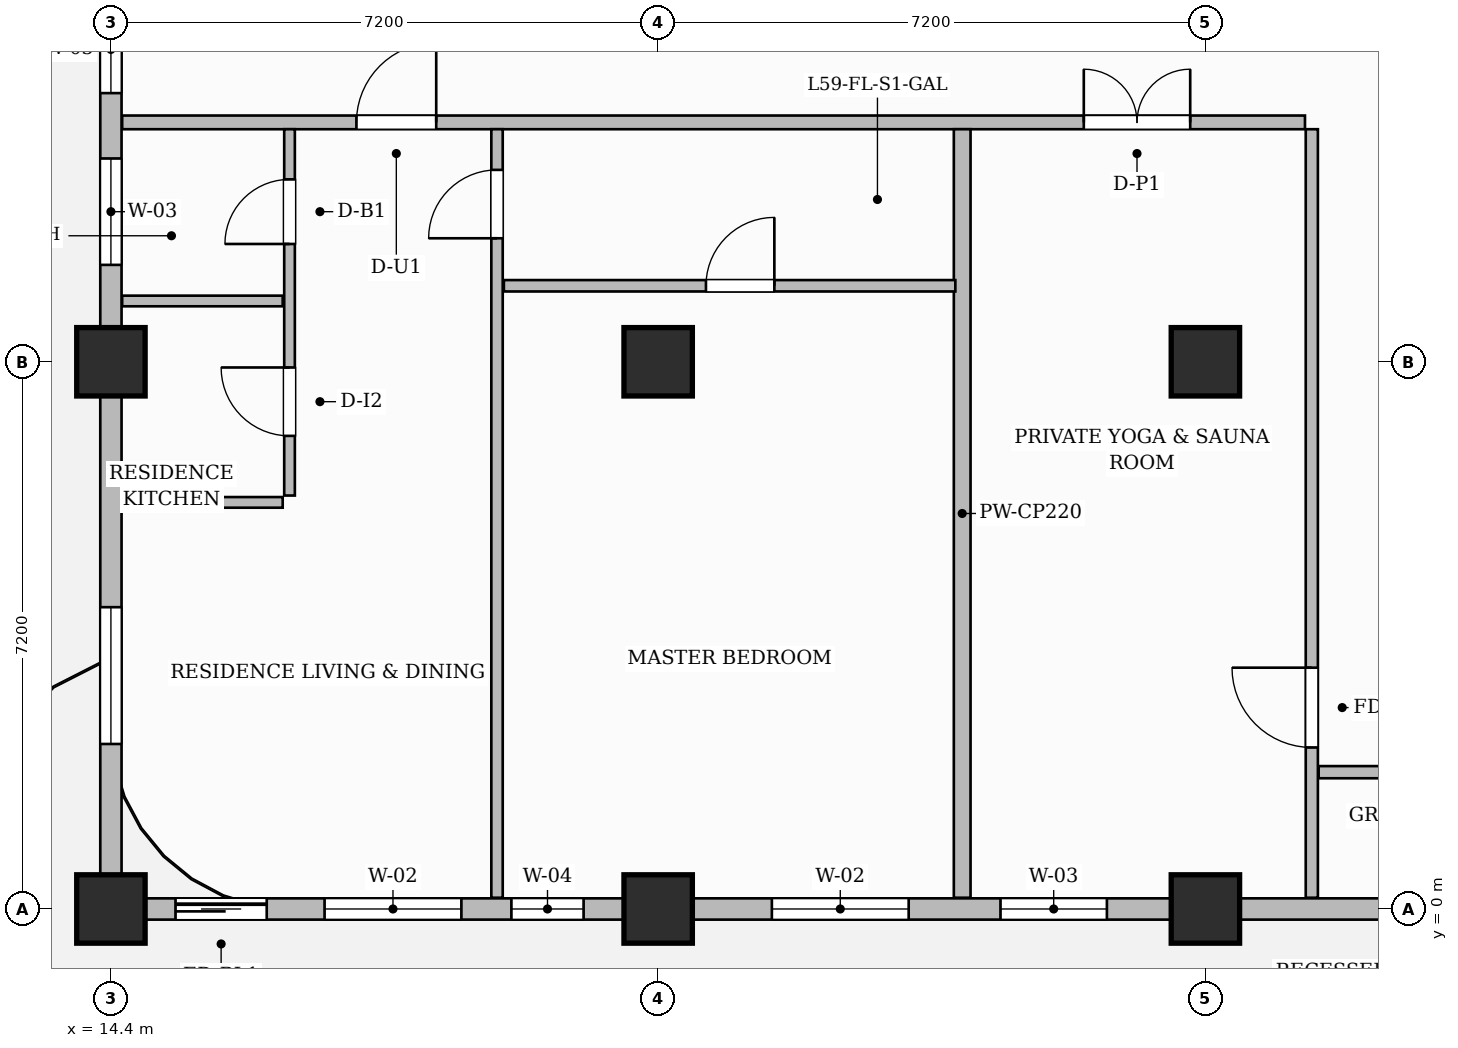
"""IFC4 building model, lengths in metres.
Left out: names, types, materials, properties, quantities, classifications, styles, units other than length and angle.
Written with IfcOpenShell. Run it as: python <this file> out.ifc"""

import sys

from ifc_helpers import new_model, si_unit, direction, frame, frame_2d, origin, origin_2d, place, context, subcontext, project, spatial, rectangle, extrude, source, transform, mapped, element, fill, save


model = new_model("IFC4")
c1 = context("Model", 3, precision=1e-05, world=origin(), true_north=direction((0.0, 1.0)))
c2 = subcontext(c1, "Body", "Model", "MODEL_VIEW")
j1 = project(units=[si_unit("LENGTHUNIT", "METRE"), si_unit("PLANEANGLEUNIT", "RADIAN")], contexts=[c1])
p1 = place(None, origin())
s1 = spatial("IfcSite", under=j1, at=p1, CompositionType="ELEMENT")
p2 = place(p1, origin())
s2 = spatial("IfcBuilding", under=s1, at=p2, CompositionType="ELEMENT")
p3 = place(p2, frame((0.0, 0.0, 236.55)))
s3 = spatial("IfcBuildingStorey", under=s2, at=p3, CompositionType="ELEMENT", Elevation=236.55)
m1 = source(origin(), c2, "Body", "SweptSolid", [
    extrude(rectangle(XDim=0.9, YDim=0.9, at=origin_2d()), origin(), (0.0, 0.0, 1.0), 3.85),
])
for number, where, z_axis, x_axis in (
    (1, (14.4, 0.0, 0.0), (0.0, 0.0, 1.0), (1.0, 0.0, 0.0)),
    (2, (14.4, 7.2, 0.0), (0.0, 0.0, 1.0), (1.0, 0.0, 0.0)),
    (3, (21.6, 0.0, 0.0), (0.0, 0.0, 1.0), (1.0, 0.0, 0.0)),
    (4, (21.6, 7.2, 0.0), (0.0, 0.0, 1.0), (1.0, 0.0, 0.0)),
    (5, (28.8, 0.0, 0.0), (0.0, 0.0, 1.0), (1.0, 0.0, 0.0)),
    (6, (28.8, 7.2, 0.0), (0.0, 0.0, 1.0), (1.0, 0.0, 0.0)),
):
    element("IfcColumn", number, at=place(p3, frame(where, z_axis=z_axis, x_axis=x_axis)), inside=s3, PredefinedType="COLUMN", context=c2, shape_type="MappedRepresentation", body=[
        mapped(m1, transform((0.0, 0.0, 0.0), scale=1.0)),
    ])
p4 = place(p3, frame((14.548, 10.35, 0.0), z_axis=(0.0, 0.0, 1.0), x_axis=(1.0, 0.0, 0.0)))
e7 = element("IfcWall", 7, at=p4, inside=s3, PredefinedType="PARTITIONING", context=c2, shape_type="SweptSolid", body=[
    extrude(rectangle(XDim=15.562, YDim=0.18, at=frame_2d((7.781, 0.0))), origin(), (0.0, 0.0, 1.0), 3.6),
])
p5 = place(p4, frame((3.082, 0.0, 0.0)))
e8 = element("IfcOpeningElement", 8, at=p5, cuts=e7, PredefinedType="OPENING", context=c2, shape_type="SweptSolid", body=[
    extrude(rectangle(XDim=1.05, YDim=2.25, at=frame_2d((0.525, 1.125))), frame((0.0, 0.1, 0.0), z_axis=(0.0, -1.0, 0.0), x_axis=(1.0, 0.0, 0.0)), (0.0, 0.0, 1.0), 0.2),
])
p6 = place(p4, frame((12.652, 0.0, 0.0)))
e9 = element("IfcOpeningElement", 9, at=p6, cuts=e7, PredefinedType="OPENING", context=c2, shape_type="SweptSolid", body=[
    extrude(rectangle(XDim=1.4, YDim=2.35, at=frame_2d((0.7, 1.175))), frame((0.0, 0.1, 0.0), z_axis=(0.0, -1.0, 0.0), x_axis=(1.0, 0.0, 0.0)), (0.0, 0.0, 1.0), 0.2),
])
p7 = place(p3, frame((30.2, 0.148, 0.0), z_axis=(0.0, 0.0, 1.0), x_axis=(0.0, 1.0, 0.0)))
e10 = element("IfcWall", 10, at=p7, inside=s3, PredefinedType="PARTITIONING", context=c2, shape_type="SweptSolid", body=[
    extrude(rectangle(XDim=10.112, YDim=0.16, at=frame_2d((5.056, 0.0))), origin(), (0.0, 0.0, 1.0), 3.6),
])
p8 = place(p7, frame((1.977, 0.0, 0.0)))
e11 = element("IfcOpeningElement", 11, at=p8, cuts=e10, PredefinedType="OPENING", context=c2, shape_type="SweptSolid", body=[
    extrude(rectangle(XDim=1.05, YDim=2.15, at=frame_2d((0.525, 1.075))), frame((0.0, 0.09, 0.0), z_axis=(0.0, -1.0, 0.0), x_axis=(1.0, 0.0, 0.0)), (0.0, 0.0, 1.0), 0.18),
])
p9 = place(p3, frame((30.29, 1.8, 0.0), z_axis=(0.0, 0.0, 1.0), x_axis=(1.0, 0.0, 0.0)))
e12 = element("IfcWall", 12, at=p9, inside=s3, PredefinedType="PARTITIONING", context=c2, shape_type="SweptSolid", body=[
    extrude(rectangle(XDim=19.37, YDim=0.16, at=frame_2d((9.685, 0.0))), origin(), (0.0, 0.0, 1.0), 3.6),
])
p10 = place(p9, frame((3.054, 0.0, 0.0)))
e13 = element("IfcOpeningElement", 13, at=p10, cuts=e12, PredefinedType="OPENING", context=c2, shape_type="SweptSolid", body=[
    extrude(rectangle(XDim=0.9, YDim=2.15, at=frame_2d((0.45, 1.075))), frame((0.0, 0.09, 0.0), z_axis=(0.0, -1.0, 0.0), x_axis=(1.0, 0.0, 0.0)), (0.0, 0.0, 1.0), 0.18),
])
p11 = place(p9, frame((9.66, 0.0, 0.0)))
e14 = element("IfcOpeningElement", 14, at=p11, cuts=e12, PredefinedType="OPENING", context=c2, shape_type="SweptSolid", body=[
    extrude(rectangle(XDim=0.9, YDim=2.15, at=frame_2d((0.45, 1.075))), frame((0.0, 0.09, 0.0), z_axis=(0.0, -1.0, 0.0), x_axis=(1.0, 0.0, 0.0)), (0.0, 0.0, 1.0), 0.18),
])
p12 = place(p9, frame((15.86, 0.0, 0.0)))
e15 = element("IfcOpeningElement", 15, at=p12, cuts=e12, PredefinedType="OPENING", context=c2, shape_type="SweptSolid", body=[
    extrude(rectangle(XDim=0.9, YDim=2.15, at=frame_2d((0.45, 1.075))), frame((0.0, 0.09, 0.0), z_axis=(0.0, -1.0, 0.0), x_axis=(1.0, 0.0, 0.0)), (0.0, 0.0, 1.0), 0.18),
])
p13 = place(p3, frame((25.6, 0.148, 0.0), z_axis=(0.0, 0.0, 1.0), x_axis=(0.0, 1.0, 0.0)))
e16 = element("IfcWall", 16, at=p13, inside=s3, PredefinedType="PARTITIONING", context=c2, shape_type="SweptSolid", body=[
    extrude(rectangle(XDim=10.112, YDim=0.22, at=frame_2d((5.056, 0.0))), origin(), (0.0, 0.0, 1.0), 3.6),
])
p14 = place(p3, frame((16.75, 5.44, 0.0), z_axis=(0.0, 0.0, 1.0), x_axis=(0.0, 1.0, 0.0)))
e17 = element("IfcWall", 17, at=p14, inside=s3, PredefinedType="PARTITIONING", context=c2, shape_type="SweptSolid", body=[
    extrude(rectangle(XDim=4.82, YDim=0.14, at=frame_2d((2.41, 0.0))), origin(), (0.0, 0.0, 1.0), 3.6),
])
p15 = place(p14, frame((0.785, 0.0, 0.0)))
e18 = element("IfcOpeningElement", 18, at=p15, cuts=e17, PredefinedType="OPENING", context=c2, shape_type="SweptSolid", body=[
    extrude(rectangle(XDim=0.9, YDim=2.15, at=frame_2d((0.45, 1.075))), frame((0.0, 0.08, 0.0), z_axis=(0.0, -1.0, 0.0), x_axis=(1.0, 0.0, 0.0)), (0.0, 0.0, 1.0), 0.16),
])
p16 = place(p14, frame((3.31, 0.0, 0.0)))
e19 = element("IfcOpeningElement", 19, at=p16, cuts=e17, PredefinedType="OPENING", context=c2, shape_type="SweptSolid", body=[
    extrude(rectangle(XDim=0.85, YDim=2.1, at=frame_2d((0.425, 1.05))), frame((0.0, 0.08, 0.0), z_axis=(0.0, -1.0, 0.0), x_axis=(1.0, 0.0, 0.0)), (0.0, 0.0, 1.0), 0.16),
])
for number, where, z_axis, x_axis in (
    (20, (14.548, 8.0, 0.0), (0.0, 0.0, 1.0), (1.0, 0.0, 0.0)),
    (21, (14.548, 5.35, 0.0), (0.0, 0.0, 1.0), (1.0, 0.0, 0.0)),
):
    element("IfcWall", number, at=place(p3, frame(where, z_axis=z_axis, x_axis=x_axis)), inside=s3, PredefinedType="PARTITIONING", context=c2, shape_type="SweptSolid", body=[
        extrude(rectangle(XDim=2.112, YDim=0.14, at=frame_2d((1.056, 0.0))), origin(), (0.0, 0.0, 1.0), 3.6),
    ])
p17 = place(p3, frame((19.48, 0.148, 0.0), z_axis=(0.0, 0.0, 1.0), x_axis=(0.0, 1.0, 0.0)))
e22 = element("IfcWall", 22, at=p17, inside=s3, PredefinedType="PARTITIONING", context=c2, shape_type="SweptSolid", body=[
    extrude(rectangle(XDim=10.112, YDim=0.15, at=frame_2d((5.056, 0.0))), origin(), (0.0, 0.0, 1.0), 3.6),
])
p18 = place(p17, frame((8.677, 0.0, 0.0)))
e23 = element("IfcOpeningElement", 23, at=p18, cuts=e22, PredefinedType="OPENING", context=c2, shape_type="SweptSolid", body=[
    extrude(rectangle(XDim=0.9, YDim=2.15, at=frame_2d((0.45, 1.075))), frame((0.0, 0.085, 0.0), z_axis=(0.0, -1.0, 0.0), x_axis=(1.0, 0.0, 0.0)), (0.0, 0.0, 1.0), 0.17),
])
p19 = place(p3, frame((19.57, 8.2, 0.0), z_axis=(0.0, 0.0, 1.0), x_axis=(1.0, 0.0, 0.0)))
e24 = element("IfcWall", 24, at=p19, inside=s3, PredefinedType="PARTITIONING", context=c2, shape_type="SweptSolid", body=[
    extrude(rectangle(XDim=5.94, YDim=0.15, at=frame_2d((2.97, 0.0))), origin(), (0.0, 0.0, 1.0), 3.6),
])
p20 = place(p19, frame((2.659, 0.0, 0.0)))
e25 = element("IfcOpeningElement", 25, at=p20, cuts=e24, PredefinedType="OPENING", context=c2, shape_type="SweptSolid", body=[
    extrude(rectangle(XDim=0.9, YDim=2.15, at=frame_2d((0.45, 1.075))), frame((0.0, 0.085, 0.0), z_axis=(0.0, -1.0, 0.0), x_axis=(1.0, 0.0, 0.0)), (0.0, 0.0, 1.0), 0.17),
])
p21 = place(p3, frame((14.4, 0.0, 0.0), z_axis=(0.0, 0.0, 1.0), x_axis=(1.0, 0.0, 0.0)))
e26 = element("IfcWall", 26, at=p21, inside=s3, PredefinedType="SOLIDWALL", context=c2, shape_type="SweptSolid", body=[
    extrude(rectangle(XDim=35.4, YDim=0.28, at=frame_2d((17.7, 0.0))), origin(), (0.0, 0.0, 1.0), 3.135),
])
p22 = place(p21, frame((0.85, 0.0, 0.0)))
e27 = element("IfcOpeningElement", 27, at=p22, cuts=e26, PredefinedType="OPENING", context=c2, shape_type="SweptSolid", body=[
    extrude(rectangle(XDim=1.2, YDim=2.2, at=frame_2d((0.6, 1.1))), frame((0.0, 0.15, 0.0), z_axis=(0.0, -1.0, 0.0), x_axis=(1.0, 0.0, 0.0)), (0.0, 0.0, 1.0), 0.3),
])
p23 = place(p21, frame((2.811, 0.0, 0.8)))
e28 = element("IfcOpeningElement", 28, at=p23, cuts=e26, PredefinedType="OPENING", context=c2, shape_type="SweptSolid", body=[
    extrude(rectangle(XDim=1.8, YDim=1.85, at=frame_2d((0.9, 0.925))), frame((0.0, 0.15, 0.0), z_axis=(0.0, -1.0, 0.0), x_axis=(1.0, 0.0, 0.0)), (0.0, 0.0, 1.0), 0.3),
])
p24 = place(p21, frame((5.269, 0.0, 0.8)))
e29 = element("IfcOpeningElement", 29, at=p24, cuts=e26, PredefinedType="OPENING", context=c2, shape_type="SweptSolid", body=[
    extrude(rectangle(XDim=0.95, YDim=1.75, at=frame_2d((0.475, 0.875))), frame((0.0, 0.15, 0.0), z_axis=(0.0, -1.0, 0.0), x_axis=(1.0, 0.0, 0.0)), (0.0, 0.0, 1.0), 0.3),
])
p25 = place(p21, frame((8.696, 0.0, 0.8)))
e30 = element("IfcOpeningElement", 30, at=p25, cuts=e26, PredefinedType="OPENING", context=c2, shape_type="SweptSolid", body=[
    extrude(rectangle(XDim=1.8, YDim=1.85, at=frame_2d((0.9, 0.925))), frame((0.0, 0.15, 0.0), z_axis=(0.0, -1.0, 0.0), x_axis=(1.0, 0.0, 0.0)), (0.0, 0.0, 1.0), 0.3),
])
p26 = place(p21, frame((11.704, 0.0, 0.8)))
e31 = element("IfcOpeningElement", 31, at=p26, cuts=e26, PredefinedType="OPENING", context=c2, shape_type="SweptSolid", body=[
    extrude(rectangle(XDim=1.4, YDim=1.85, at=frame_2d((0.7, 0.925))), frame((0.0, 0.15, 0.0), z_axis=(0.0, -1.0, 0.0), x_axis=(1.0, 0.0, 0.0)), (0.0, 0.0, 1.0), 0.3),
])
p27 = place(p21, frame((16.804, 0.0, 0.8)))
e32 = element("IfcOpeningElement", 32, at=p27, cuts=e26, PredefinedType="OPENING", context=c2, shape_type="SweptSolid", body=[
    extrude(rectangle(XDim=1.8, YDim=1.85, at=frame_2d((0.9, 0.925))), frame((0.0, 0.15, 0.0), z_axis=(0.0, -1.0, 0.0), x_axis=(1.0, 0.0, 0.0)), (0.0, 0.0, 1.0), 0.3),
])
p28 = place(p21, frame((21.521, 0.0, 0.8)))
e33 = element("IfcOpeningElement", 33, at=p28, cuts=e26, PredefinedType="OPENING", context=c2, shape_type="SweptSolid", body=[
    extrude(rectangle(XDim=0.95, YDim=1.75, at=frame_2d((0.475, 0.875))), frame((0.0, 0.15, 0.0), z_axis=(0.0, -1.0, 0.0), x_axis=(1.0, 0.0, 0.0)), (0.0, 0.0, 1.0), 0.3),
])
p29 = place(p21, frame((23.904, 0.0, 0.8)))
e34 = element("IfcOpeningElement", 34, at=p29, cuts=e26, PredefinedType="OPENING", context=c2, shape_type="SweptSolid", body=[
    extrude(rectangle(XDim=1.8, YDim=1.85, at=frame_2d((0.9, 0.925))), frame((0.0, 0.15, 0.0), z_axis=(0.0, -1.0, 0.0), x_axis=(1.0, 0.0, 0.0)), (0.0, 0.0, 1.0), 0.3),
])
p30 = place(p21, frame((29.681, 0.0, 0.8)))
e35 = element("IfcOpeningElement", 35, at=p30, cuts=e26, PredefinedType="OPENING", context=c2, shape_type="SweptSolid", body=[
    extrude(rectangle(XDim=1.8, YDim=1.85, at=frame_2d((0.9, 0.925))), frame((0.0, 0.15, 0.0), z_axis=(0.0, -1.0, 0.0), x_axis=(1.0, 0.0, 0.0)), (0.0, 0.0, 1.0), 0.3),
])
p31 = place(p21, frame((32.327, 0.0, 0.8)))
e36 = element("IfcOpeningElement", 36, at=p31, cuts=e26, PredefinedType="OPENING", context=c2, shape_type="SweptSolid", body=[
    extrude(rectangle(XDim=1.8, YDim=1.85, at=frame_2d((0.9, 0.925))), frame((0.0, 0.15, 0.0), z_axis=(0.0, -1.0, 0.0), x_axis=(1.0, 0.0, 0.0)), (0.0, 0.0, 1.0), 0.3),
])
p32 = place(p3, frame((14.4, 0.05, 0.0), z_axis=(0.0, 0.0, 1.0), x_axis=(0.0, 1.0, 0.0)))
e37 = element("IfcWall", 37, at=p32, inside=s3, PredefinedType="SOLIDWALL", context=c2, shape_type="SweptSolid", body=[
    extrude(rectangle(XDim=21.5, YDim=0.28, at=frame_2d((10.75, 0.0))), origin(), (0.0, 0.0, 1.0), 3.135),
])
p33 = place(p32, frame((2.121, 0.0, 0.8)))
e38 = element("IfcOpeningElement", 38, at=p33, cuts=e37, PredefinedType="OPENING", context=c2, shape_type="SweptSolid", body=[
    extrude(rectangle(XDim=1.8, YDim=1.85, at=frame_2d((0.9, 0.925))), frame((0.0, 0.15, 0.0), z_axis=(0.0, -1.0, 0.0), x_axis=(1.0, 0.0, 0.0)), (0.0, 0.0, 1.0), 0.3),
])
p34 = place(p32, frame((8.425, 0.0, 0.8)))
e39 = element("IfcOpeningElement", 39, at=p34, cuts=e37, PredefinedType="OPENING", context=c2, shape_type="SweptSolid", body=[
    extrude(rectangle(XDim=1.4, YDim=1.85, at=frame_2d((0.7, 0.925))), frame((0.0, 0.15, 0.0), z_axis=(0.0, -1.0, 0.0), x_axis=(1.0, 0.0, 0.0)), (0.0, 0.0, 1.0), 0.3),
])
p35 = place(p32, frame((10.685, 0.0, 0.8)))
e40 = element("IfcOpeningElement", 40, at=p35, cuts=e37, PredefinedType="OPENING", context=c2, shape_type="SweptSolid", body=[
    extrude(rectangle(XDim=1.15, YDim=1.8, at=frame_2d((0.575, 0.9))), frame((0.0, 0.15, 0.0), z_axis=(0.0, -1.0, 0.0), x_axis=(1.0, 0.0, 0.0)), (0.0, 0.0, 1.0), 0.3),
])
p36 = place(p32, frame((12.414, 0.0, 0.8)))
e41 = element("IfcOpeningElement", 41, at=p36, cuts=e37, PredefinedType="OPENING", context=c2, shape_type="SweptSolid", body=[
    extrude(rectangle(XDim=0.95, YDim=1.75, at=frame_2d((0.475, 0.875))), frame((0.0, 0.15, 0.0), z_axis=(0.0, -1.0, 0.0), x_axis=(1.0, 0.0, 0.0)), (0.0, 0.0, 1.0), 0.3),
])
p37 = place(p32, frame((15.675, 0.0, 0.8)))
e42 = element("IfcOpeningElement", 42, at=p37, cuts=e37, PredefinedType="OPENING", context=c2, shape_type="SweptSolid", body=[
    extrude(rectangle(XDim=1.8, YDim=1.85, at=frame_2d((0.9, 0.925))), frame((0.0, 0.15, 0.0), z_axis=(0.0, -1.0, 0.0), x_axis=(1.0, 0.0, 0.0)), (0.0, 0.0, 1.0), 0.3),
])
p38 = place(p32, frame((18.425, 0.0, 0.8)))
e43 = element("IfcOpeningElement", 43, at=p38, cuts=e37, PredefinedType="OPENING", context=c2, shape_type="SweptSolid", body=[
    extrude(rectangle(XDim=1.8, YDim=1.85, at=frame_2d((0.9, 0.925))), frame((0.0, 0.15, 0.0), z_axis=(0.0, -1.0, 0.0), x_axis=(1.0, 0.0, 0.0)), (0.0, 0.0, 1.0), 0.3),
])
m2 = source(origin(), c2, "Body", "SweptSolid", [
    extrude(rectangle(XDim=1.05, YDim=2.15, at=frame_2d((0.525, 1.075))), frame((0.0, 0.025, 0.0), z_axis=(0.0, -1.0, 0.0), x_axis=(1.0, 0.0, 0.0)), (0.0, 0.0, 1.0), 0.05),
])
p39 = place(p8, origin())
e44 = element("IfcDoor", 44, at=p39, inside=s3, OperationType="SINGLE_SWING_RIGHT", PredefinedType="DOOR", context=c2, shape_type="MappedRepresentation", body=[
    mapped(m2, transform((0.0, 0.0, 0.0), scale=1.0)),
])
fill(e11, e44)
m3 = source(origin(), c2, "Body", "SweptSolid", [
    extrude(rectangle(XDim=0.9, YDim=2.15, at=frame_2d((0.45, 1.075))), frame((0.0, 0.025, 0.0), z_axis=(0.0, -1.0, 0.0), x_axis=(1.0, 0.0, 0.0)), (0.0, 0.0, 1.0), 0.05),
])
p40 = place(p15, origin())
e45 = element("IfcDoor", 45, at=p40, inside=s3, OperationType="SINGLE_SWING_RIGHT", PredefinedType="DOOR", context=c2, shape_type="MappedRepresentation", body=[
    mapped(m3, transform((0.0, 0.0, 0.0), scale=1.0)),
])
fill(e18, e45)
m4 = source(origin(), c2, "Body", "SweptSolid", [
    extrude(rectangle(XDim=0.85, YDim=2.1, at=frame_2d((0.425, 1.05))), frame((0.0, 0.025, 0.0), z_axis=(0.0, -1.0, 0.0), x_axis=(1.0, 0.0, 0.0)), (0.0, 0.0, 1.0), 0.05),
])
p41 = place(p16, origin())
e46 = element("IfcDoor", 46, at=p41, inside=s3, OperationType="SINGLE_SWING_LEFT", PredefinedType="DOOR", context=c2, shape_type="MappedRepresentation", body=[
    mapped(m4, transform((0.0, 0.0, 0.0), scale=1.0)),
])
fill(e19, e46)
m5 = source(origin(), c2, "Body", "SweptSolid", [
    extrude(rectangle(XDim=1.05, YDim=2.25, at=frame_2d((0.525, 1.125))), frame((0.0, 0.025, 0.0), z_axis=(0.0, -1.0, 0.0), x_axis=(1.0, 0.0, 0.0)), (0.0, 0.0, 1.0), 0.05),
])
p42 = place(p5, origin())
e47 = element("IfcDoor", 47, at=p42, inside=s3, OperationType="SINGLE_SWING_RIGHT", PredefinedType="DOOR", context=c2, shape_type="MappedRepresentation", body=[
    mapped(m5, transform((0.0, 0.0, 0.0), scale=1.0)),
])
fill(e8, e47)
p43 = place(p18, origin())
e48 = element("IfcDoor", 48, at=p43, inside=s3, OperationType="SINGLE_SWING_LEFT", PredefinedType="DOOR", context=c2, shape_type="MappedRepresentation", body=[
    mapped(m3, transform((0.0, 0.0, 0.0), scale=1.0)),
])
fill(e23, e48)
p44 = place(p20, origin())
e49 = element("IfcDoor", 49, at=p44, inside=s3, OperationType="SINGLE_SWING_RIGHT", PredefinedType="DOOR", context=c2, shape_type="MappedRepresentation", body=[
    mapped(m3, transform((0.0, 0.0, 0.0), scale=1.0)),
])
fill(e25, e49)
m6 = source(origin(), c2, "Body", "SweptSolid", [
    extrude(rectangle(XDim=1.4, YDim=2.35, at=frame_2d((0.7, 1.175))), frame((0.0, 0.025, 0.0), z_axis=(0.0, -1.0, 0.0), x_axis=(1.0, 0.0, 0.0)), (0.0, 0.0, 1.0), 0.05),
])
p45 = place(p6, origin())
e50 = element("IfcDoor", 50, at=p45, inside=s3, OperationType="DOUBLE_DOOR_SINGLE_SWING", PredefinedType="DOOR", context=c2, shape_type="MappedRepresentation", body=[
    mapped(m6, transform((0.0, 0.0, 0.0), scale=1.0)),
])
fill(e9, e50)
m7 = source(origin(), c2, "Body", "SweptSolid", [
    extrude(rectangle(XDim=1.2, YDim=2.2, at=frame_2d((0.6, 1.1))), frame((0.0, 0.025, 0.0), z_axis=(0.0, -1.0, 0.0), x_axis=(1.0, 0.0, 0.0)), (0.0, 0.0, 1.0), 0.05),
])
p46 = place(p22, origin())
e51 = element("IfcDoor", 51, at=p46, inside=s3, OperationType="SLIDING_TO_LEFT", PredefinedType="DOOR", context=c2, shape_type="MappedRepresentation", body=[
    mapped(m7, transform((0.0, 0.0, 0.0), scale=1.0)),
])
fill(e27, e51)
m8 = source(origin(), c2, "Body", "SweptSolid", [
    extrude(rectangle(XDim=1.8, YDim=1.85, at=frame_2d((0.9, 0.925))), frame((0.0, 0.03, 0.0), z_axis=(0.0, -1.0, 0.0), x_axis=(1.0, 0.0, 0.0)), (0.0, 0.0, 1.0), 0.06),
])
p47 = place(p23, origin())
e52 = element("IfcWindow", 52, at=p47, inside=s3, PartitioningType="DOUBLE_PANEL_VERTICAL", PredefinedType="WINDOW", context=c2, shape_type="MappedRepresentation", body=[
    mapped(m8, transform((0.0, 0.0, 0.0), scale=1.0)),
])
fill(e28, e52)
m9 = source(origin(), c2, "Body", "SweptSolid", [
    extrude(rectangle(XDim=0.95, YDim=1.75, at=frame_2d((0.475, 0.875))), frame((0.0, 0.03, 0.0), z_axis=(0.0, -1.0, 0.0), x_axis=(1.0, 0.0, 0.0)), (0.0, 0.0, 1.0), 0.06),
])
p48 = place(p24, origin())
e53 = element("IfcWindow", 53, at=p48, inside=s3, PartitioningType="SINGLE_PANEL", PredefinedType="WINDOW", context=c2, shape_type="MappedRepresentation", body=[
    mapped(m9, transform((0.0, 0.0, 0.0), scale=1.0)),
])
fill(e29, e53)
p49 = place(p25, origin())
e54 = element("IfcWindow", 54, at=p49, inside=s3, PartitioningType="DOUBLE_PANEL_VERTICAL", PredefinedType="WINDOW", context=c2, shape_type="MappedRepresentation", body=[
    mapped(m8, transform((0.0, 0.0, 0.0), scale=1.0)),
])
fill(e30, e54)
m10 = source(origin(), c2, "Body", "SweptSolid", [
    extrude(rectangle(XDim=1.4, YDim=1.85, at=frame_2d((0.7, 0.925))), frame((0.0, 0.03, 0.0), z_axis=(0.0, -1.0, 0.0), x_axis=(1.0, 0.0, 0.0)), (0.0, 0.0, 1.0), 0.06),
])
p50 = place(p26, origin())
e55 = element("IfcWindow", 55, at=p50, inside=s3, PartitioningType="SINGLE_PANEL", PredefinedType="WINDOW", context=c2, shape_type="MappedRepresentation", body=[
    mapped(m10, transform((0.0, 0.0, 0.0), scale=1.0)),
])
fill(e31, e55)
p51 = place(p33, origin())
e56 = element("IfcWindow", 56, at=p51, inside=s3, PartitioningType="DOUBLE_PANEL_VERTICAL", PredefinedType="WINDOW", context=c2, shape_type="MappedRepresentation", body=[
    mapped(m8, transform((0.0, 0.0, 0.0), scale=1.0)),
])
fill(e38, e56)
p52 = place(p34, origin())
e57 = element("IfcWindow", 57, at=p52, inside=s3, PartitioningType="SINGLE_PANEL", PredefinedType="WINDOW", context=c2, shape_type="MappedRepresentation", body=[
    mapped(m10, transform((0.0, 0.0, 0.0), scale=1.0)),
])
fill(e39, e57)
m11 = source(origin(), c2, "Body", "SweptSolid", [
    extrude(rectangle(XDim=1.15, YDim=1.8, at=frame_2d((0.575, 0.9))), frame((0.0, 0.03, 0.0), z_axis=(0.0, -1.0, 0.0), x_axis=(1.0, 0.0, 0.0)), (0.0, 0.0, 1.0), 0.06),
])
p53 = place(p35, origin())
e58 = element("IfcWindow", 58, at=p53, inside=s3, PartitioningType="SINGLE_PANEL", PredefinedType="WINDOW", context=c2, shape_type="MappedRepresentation", body=[
    mapped(m11, transform((0.0, 0.0, 0.0), scale=1.0)),
])
fill(e40, e58)
save(model, sys.argv[1])
